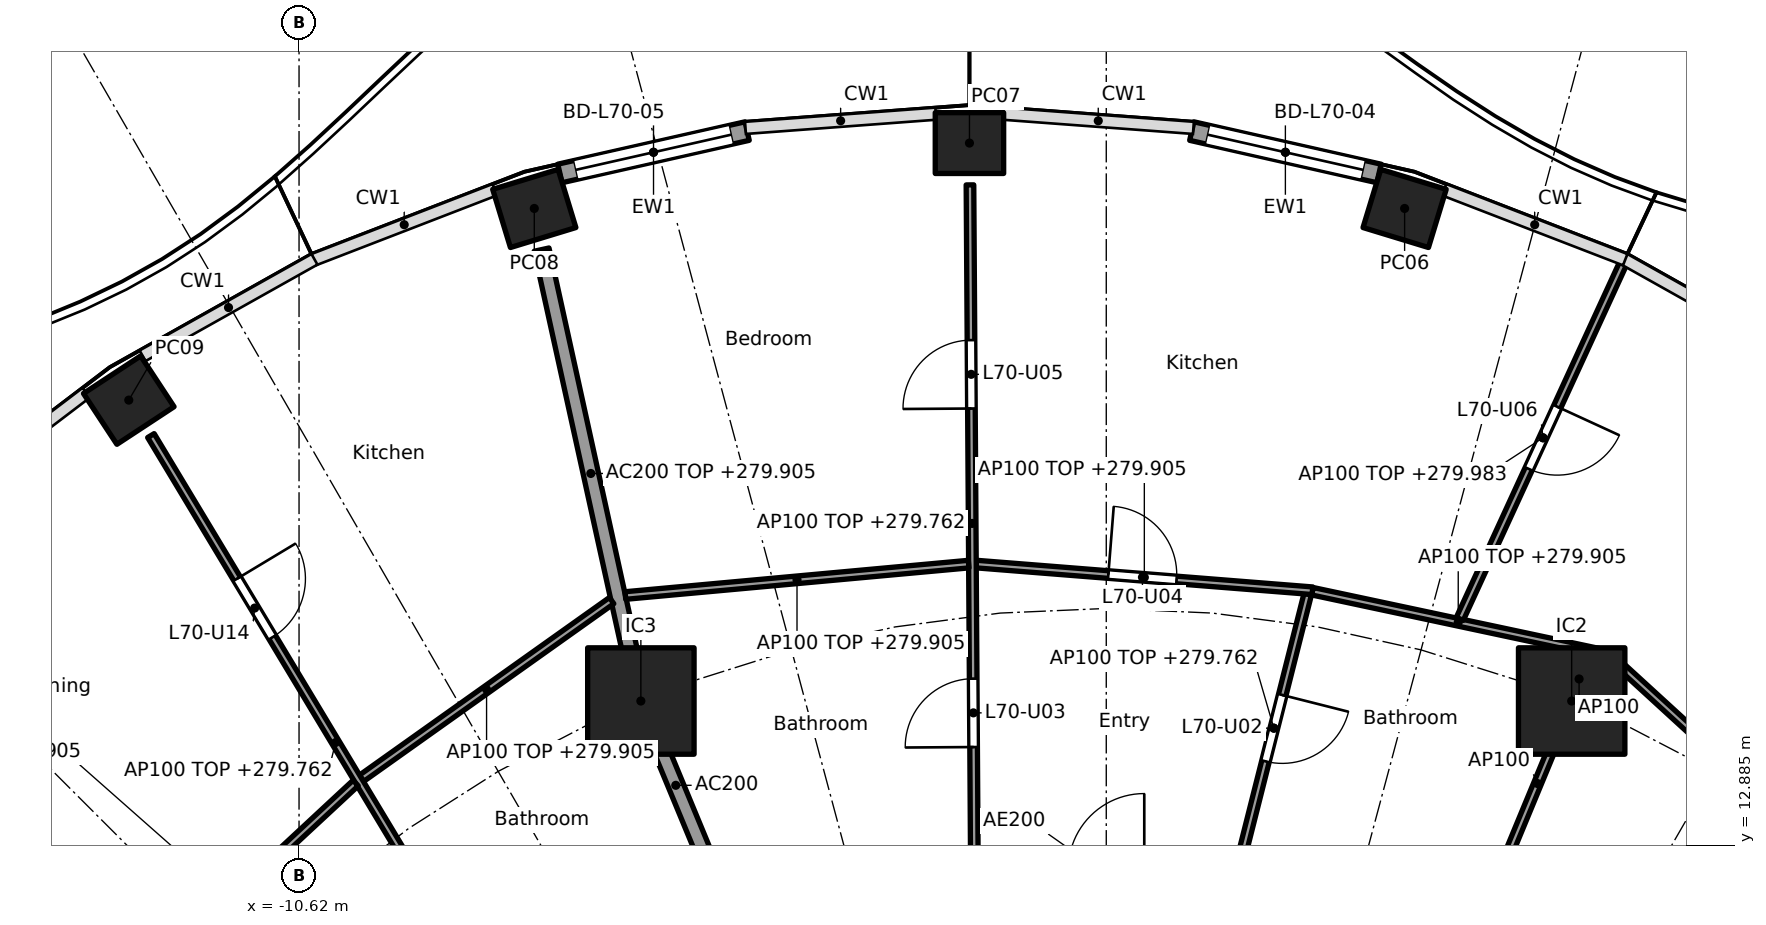
"""IFC4 building model, lengths in metres.
Left out: names, types, materials, properties, quantities, classifications, styles, units other than length and angle.
Written with IfcOpenShell. Run it as: python <this file> out.ifc"""

import sys

from ifc_helpers import new_model, si_unit, direction, frame, frame_2d, origin, origin_2d, place, context, subcontext, project, spatial, rectangle, hollow_rectangle, extrude, element, fill, save


model = new_model("IFC4")
c1 = context("Model", 3, precision=1e-05, world=origin(), true_north=direction((0.0, 1.0)))
c2 = subcontext(c1, "Body", "Model", "MODEL_VIEW")
j1 = project(units=[si_unit("LENGTHUNIT", "METRE"), si_unit("PLANEANGLEUNIT", "RADIAN")], contexts=[c1])
p1 = place(None, origin())
s1 = spatial("IfcSite", under=j1, at=p1, CompositionType="ELEMENT")
p2 = place(p1, origin())
s2 = spatial("IfcBuilding", under=s1, at=p2, CompositionType="ELEMENT")
p3 = place(p2, frame((0.0, 0.0, 277.0)))
s3 = spatial("IfcBuildingStorey", under=s2, at=p3, CompositionType="ELEMENT", Elevation=277.0)
for number, where, z_axis, x_axis in (
    (1, (3.925, 21.262, 0.0), (0.0, 0.0, 1.0), (-0.957, 0.292, 0.0)),
    (2, (-1.8, 22.122, 0.0), (0.0, 0.0, 1.0), (-1.0, 0.0, 0.0)),
    (3, (-7.525, 21.262, 0.0), (0.0, 0.0, 1.0), (-0.957, -0.292, 0.0)),
    (4, (-12.86, 18.741, 0.0), (0.0, 0.0, 1.0), (-0.836, -0.549, 0.0)),
):
    element("IfcColumn", number, at=place(p3, frame(where, z_axis=z_axis, x_axis=x_axis)), inside=s3, PredefinedType="COLUMN", context=c2, shape_type="SweptSolid", body=[
        extrude(hollow_rectangle(XDim=0.9, YDim=0.8, WallThickness=0.028, at=origin_2d()), origin(), (0.0, 0.0, 1.0), 3.7),
    ])
for number, where, z_axis, x_axis in (
    (5, (6.123, 14.782, 0.0), (0.0, 0.0, 1.0), (1.0, 0.0, 0.0)),
    (6, (-6.123, 14.782, 0.0), (0.0, 0.0, 1.0), (1.0, 0.0, 0.0)),
):
    element("IfcColumn", number, at=place(p3, frame(where, z_axis=z_axis, x_axis=x_axis)), inside=s3, PredefinedType="COLUMN", context=c2, shape_type="SweptSolid", body=[
        extrude(rectangle(XDim=1.4, YDim=1.4, at=origin_2d()), origin(), (0.0, 0.0, 1.0), 3.7),
    ])
p4 = place(p3, frame((1.125, 22.28, 0.0), z_axis=(0.0, 0.0, 1.0), x_axis=(0.97531487046, -0.22081871175, 0.0)))
e7 = element("IfcWall", 7, at=p4, inside=s3, PredefinedType="SOLIDWALL", context=c2, shape_type="SweptSolid", body=[
    extrude(rectangle(XDim=2.525, YDim=0.25, at=frame_2d((1.263, 0.0))), origin(), (0.0, 0.0, 1.0), 3.44),
])
p5 = place(p4, frame((0.213, 0.0, 0.0)))
e8 = element("IfcOpeningElement", 8, at=p5, cuts=e7, PredefinedType="OPENING", context=c2, shape_type="SweptSolid", body=[
    extrude(rectangle(XDim=2.1, YDim=2.4, at=frame_2d((1.05, 1.2))), frame((0.0, 0.135, 0.0), z_axis=(0.0, -1.0, 0.0), x_axis=(1.0, 0.0, 0.0)), (0.0, 0.0, 1.0), 0.27),
])
p6 = place(p3, frame((-7.188, 21.723, 0.0), z_axis=(0.0, 0.0, 1.0), x_axis=(0.975319584032, 0.220797891756, 0.0)))
e9 = element("IfcWall", 9, at=p6, inside=s3, PredefinedType="SOLIDWALL", context=c2, shape_type="SweptSolid", body=[
    extrude(rectangle(XDim=2.525, YDim=0.25, at=frame_2d((1.263, 0.0))), origin(), (0.0, 0.0, 1.0), 3.44),
])
p7 = place(p6, frame((0.213, 0.0, 0.0)))
e10 = element("IfcOpeningElement", 10, at=p7, cuts=e9, PredefinedType="OPENING", context=c2, shape_type="SweptSolid", body=[
    extrude(rectangle(XDim=2.1, YDim=2.4, at=frame_2d((1.05, 1.2))), frame((0.0, 0.135, 0.0), z_axis=(0.0, -1.0, 0.0), x_axis=(1.0, 0.0, 0.0)), (0.0, 0.0, 1.0), 0.27),
])
p8 = place(p3, frame((-5.243, 12.657, 0.0), z_axis=(0.0, 0.0, 1.0), x_axis=(-0.38273085373, 0.923859888513, 0.0)))
e11 = element("IfcWall", 11, at=p8, inside=s3, PredefinedType="PARTITIONING", context=c2, shape_type="SweptSolid", body=[
    extrude(rectangle(XDim=2.199, YDim=0.2, at=frame_2d((1.1, 0.0))), origin(), (0.0, 0.0, 1.0), 3.44),
])
p9 = place(p3, frame((-6.134, 14.831, 0.0), z_axis=(0.0, 0.0, 1.0), x_axis=(-0.214842475666, 0.976648714047, 0.0)))
e12 = element("IfcWall", 12, at=p9, inside=s3, PredefinedType="PARTITIONING", context=c2, shape_type="SweptSolid", body=[
    extrude(rectangle(XDim=6.031, YDim=0.2, at=frame_2d((3.015, 0.0))), origin(), (0.0, 0.0, 1.0), 2.905),
])
p10 = place(p3, frame((10.972, 11.398, 0.0), z_axis=(0.0, 0.0, 1.0), x_axis=(-0.737838738013, 0.674977034193, 0.0)))
e13 = element("IfcWall", 13, at=p10, inside=s3, PredefinedType="PARTITIONING", context=c2, shape_type="SweptSolid", body=[
    extrude(rectangle(XDim=5.977, YDim=0.1, at=frame_2d((2.989, 0.0))), origin(), (0.0, 0.0, 1.0), 2.905),
])
p11 = place(p10, frame((2.514, 0.0, 0.0)))
e14 = element("IfcOpeningElement", 14, at=p11, cuts=e13, PredefinedType="OPENING", context=c2, shape_type="SweptSolid", body=[
    extrude(rectangle(XDim=0.9, YDim=2.1, at=frame_2d((0.45, 1.05))), frame((0.0, 0.06, 0.0), z_axis=(0.0, -1.0, 0.0), x_axis=(1.0, 0.0, 0.0)), (0.0, 0.0, 1.0), 0.12),
])
p12 = place(p3, frame((5.243, 12.657, 0.0), z_axis=(0.0, 0.0, 1.0), x_axis=(0.382719158442, 0.923864733477, 0.0)))
e15 = element("IfcWall", 15, at=p12, inside=s3, PredefinedType="PARTITIONING", context=c2, shape_type="SweptSolid", body=[
    extrude(rectangle(XDim=2.25, YDim=0.1, at=frame_2d((1.125, 0.0))), origin(), (0.0, 0.0, 1.0), 3.44),
])
p13 = place(p3, frame((6.55, 15.409, 0.0), z_axis=(0.0, 0.0, 1.0), x_axis=(-0.978051195976, 0.208364723621, 0.0)))
e16 = element("IfcWall", 16, at=p13, inside=s3, PredefinedType="PARTITIONING", context=c2, shape_type="SweptSolid", body=[
    extrude(rectangle(XDim=3.924, YDim=0.1, at=frame_2d((1.962, 0.0))), origin(), (0.0, 0.0, 1.0), 2.905),
])
p14 = place(p3, frame((4.651, 15.863, 0.0), z_axis=(0.0, 0.0, 1.0), x_axis=(0.41744196735, 0.908703584176, 0.0)))
e17 = element("IfcWall", 17, at=p14, inside=s3, PredefinedType="PARTITIONING", context=c2, shape_type="SweptSolid", body=[
    extrude(rectangle(XDim=5.242, YDim=0.1, at=frame_2d((2.621, 0.0))), origin(), (0.0, 0.0, 1.0), 2.983),
])
p15 = place(p14, frame((2.171, 0.0, 0.0)))
e18 = element("IfcOpeningElement", 18, at=p15, cuts=e17, PredefinedType="OPENING", context=c2, shape_type="SweptSolid", body=[
    extrude(rectangle(XDim=0.9, YDim=2.1, at=frame_2d((0.45, 1.05))), frame((0.0, 0.06, 0.0), z_axis=(0.0, -1.0, 0.0), x_axis=(1.0, 0.0, 0.0)), (0.0, 0.0, 1.0), 0.12),
])
p16 = place(p3, frame((1.759, 12.662, 0.0), z_axis=(0.0, 0.0, 1.0), x_axis=(0.244966765147, 0.969531476525, 0.0)))
e19 = element("IfcWall", 19, at=p16, inside=s3, PredefinedType="PARTITIONING", context=c2, shape_type="SweptSolid", body=[
    extrude(rectangle(XDim=3.638, YDim=0.1, at=frame_2d((1.819, 0.0))), origin(), (0.0, 0.0, 1.0), 2.762),
])
p17 = place(p16, frame((1.369, 0.0, 0.0)))
e20 = element("IfcOpeningElement", 20, at=p17, cuts=e19, PredefinedType="OPENING", context=c2, shape_type="SweptSolid", body=[
    extrude(rectangle(XDim=0.9, YDim=2.1, at=frame_2d((0.45, 1.05))), frame((0.0, 0.06, 0.0), z_axis=(0.0, -1.0, 0.0), x_axis=(1.0, 0.0, 0.0)), (0.0, 0.0, 1.0), 0.12),
])
p18 = place(p3, frame((2.713, 16.233, 0.0), z_axis=(0.0, 0.0, 1.0), x_axis=(-0.996870142942, 0.079056423588, 0.0)))
e21 = element("IfcWall", 21, at=p18, inside=s3, PredefinedType="PARTITIONING", context=c2, shape_type="SweptSolid", body=[
    extrude(rectangle(XDim=4.438, YDim=0.1, at=frame_2d((2.219, 0.0))), origin(), (0.0, 0.0, 1.0), 2.905),
])
p19 = place(p18, frame((1.794, 0.0, 0.0)))
e22 = element("IfcOpeningElement", 22, at=p19, cuts=e21, PredefinedType="OPENING", context=c2, shape_type="SweptSolid", body=[
    extrude(rectangle(XDim=0.9, YDim=2.1, at=frame_2d((0.45, 1.05))), frame((0.0, 0.06, 0.0), z_axis=(0.0, -1.0, 0.0), x_axis=(1.0, 0.0, 0.0)), (0.0, 0.0, 1.0), 0.12),
])
p20 = place(p3, frame((-1.736, 12.665, 0.0), z_axis=(0.0, 0.0, 1.0), x_axis=(-0.00646827636, 0.999979080482, 0.0)))
e23 = element("IfcWall", 23, at=p20, inside=s3, PredefinedType="PARTITIONING", context=c2, shape_type="SweptSolid", body=[
    extrude(rectangle(XDim=8.908, YDim=0.1, at=frame_2d((4.454, 0.0))), origin(), (0.0, 0.0, 1.0), 2.762),
])
p21 = place(p20, frame((1.512, 0.0, 0.0)))
e24 = element("IfcOpeningElement", 24, at=p21, cuts=e23, PredefinedType="OPENING", context=c2, shape_type="SweptSolid", body=[
    extrude(rectangle(XDim=0.9, YDim=2.1, at=frame_2d((0.45, 1.05))), frame((0.0, 0.06, 0.0), z_axis=(0.0, -1.0, 0.0), x_axis=(1.0, 0.0, 0.0)), (0.0, 0.0, 1.0), 0.12),
])
p22 = place(p20, frame((5.965, 0.0, 0.0)))
e25 = element("IfcOpeningElement", 25, at=p22, cuts=e23, PredefinedType="OPENING", context=c2, shape_type="SweptSolid", body=[
    extrude(rectangle(XDim=0.9, YDim=2.1, at=frame_2d((0.45, 1.05))), frame((0.0, 0.06, 0.0), z_axis=(0.0, -1.0, 0.0), x_axis=(1.0, 0.0, 0.0)), (0.0, 0.0, 1.0), 0.12),
])
p23 = place(p3, frame((-1.811, 16.583, 0.0), z_axis=(0.0, 0.0, 1.0), x_axis=(-0.995842301034, -0.091093970555, 0.0)))
e26 = element("IfcWall", 26, at=p23, inside=s3, PredefinedType="PARTITIONING", context=c2, shape_type="SweptSolid", body=[
    extrude(rectangle(XDim=4.535, YDim=0.1, at=frame_2d((2.267, 0.0))), origin(), (0.0, 0.0, 1.0), 2.905),
])
p24 = place(p3, frame((-6.508, 16.103, 0.0), z_axis=(0.0, 0.0, 1.0), x_axis=(-0.815202203556, -0.579176456114, 0.0)))
e27 = element("IfcWall", 27, at=p24, inside=s3, PredefinedType="PARTITIONING", context=c2, shape_type="SweptSolid", body=[
    extrude(rectangle(XDim=4.036, YDim=0.1, at=frame_2d((2.018, 0.0))), origin(), (0.0, 0.0, 1.0), 2.905),
])
p25 = place(p3, frame((-7.709, 10.197, 0.0), z_axis=(0.0, 0.0, 1.0), x_axis=(-0.515516160663, 0.856879856278, 0.0)))
e28 = element("IfcWall", 28, at=p25, inside=s3, PredefinedType="PARTITIONING", context=c2, shape_type="SweptSolid", body=[
    extrude(rectangle(XDim=9.426, YDim=0.1, at=frame_2d((4.713, 0.0))), origin(), (0.0, 0.0, 1.0), 2.762),
])
p26 = place(p25, frame((1.615, 0.0, 0.0)))
e29 = element("IfcOpeningElement", 29, at=p26, cuts=e28, PredefinedType="OPENING", context=c2, shape_type="SweptSolid", body=[
    extrude(rectangle(XDim=0.9, YDim=2.1, at=frame_2d((0.45, 1.05))), frame((0.0, 0.06, 0.0), z_axis=(0.0, -1.0, 0.0), x_axis=(1.0, 0.0, 0.0)), (0.0, 0.0, 1.0), 0.12),
])
p27 = place(p25, frame((6.328, 0.0, 0.0)))
e30 = element("IfcOpeningElement", 30, at=p27, cuts=e28, PredefinedType="OPENING", context=c2, shape_type="SweptSolid", body=[
    extrude(rectangle(XDim=0.9, YDim=2.1, at=frame_2d((0.45, 1.05))), frame((0.0, 0.06, 0.0), z_axis=(0.0, -1.0, 0.0), x_axis=(1.0, 0.0, 0.0)), (0.0, 0.0, 1.0), 0.12),
])
p28 = place(p3, frame((-9.875, 13.702, 0.0), z_axis=(0.0, 0.0, 1.0), x_axis=(-0.732618266441, -0.680639754699, 0.0)))
e31 = element("IfcWall", 31, at=p28, inside=s3, PredefinedType="PARTITIONING", context=c2, shape_type="SweptSolid", body=[
    extrude(rectangle(XDim=4.467, YDim=0.1, at=frame_2d((2.233, 0.0))), origin(), (0.0, 0.0, 1.0), 2.905),
])
p29 = place(p28, frame((1.783, 0.0, 0.0)))
e32 = element("IfcOpeningElement", 32, at=p29, cuts=e31, PredefinedType="OPENING", context=c2, shape_type="SweptSolid", body=[
    extrude(rectangle(XDim=0.9, YDim=2.1, at=frame_2d((0.45, 1.05))), frame((0.0, 0.06, 0.0), z_axis=(0.0, -1.0, 0.0), x_axis=(1.0, 0.0, 0.0)), (0.0, 0.0, 1.0), 0.12),
])
p30 = place(p3, frame((-10.183, 7.727, 0.0), z_axis=(0.0, 0.0, 1.0), x_axis=(-0.719063433856, 0.694944442449, 0.0)))
e33 = element("IfcWall", 33, at=p30, inside=s3, PredefinedType="PARTITIONING", context=c2, shape_type="SweptSolid", body=[
    extrude(rectangle(XDim=9.535, YDim=0.1, at=frame_2d((4.768, 0.0))), origin(), (0.0, 0.0, 1.0), 2.762),
])
p31 = place(p30, frame((1.637, 0.0, 0.0)))
e34 = element("IfcOpeningElement", 34, at=p31, cuts=e33, PredefinedType="OPENING", context=c2, shape_type="SweptSolid", body=[
    extrude(rectangle(XDim=0.9, YDim=2.1, at=frame_2d((0.45, 1.05))), frame((0.0, 0.06, 0.0), z_axis=(0.0, -1.0, 0.0), x_axis=(1.0, 0.0, 0.0)), (0.0, 0.0, 1.0), 0.12),
])
p32 = place(p30, frame((6.405, 0.0, 0.0)))
e35 = element("IfcOpeningElement", 35, at=p32, cuts=e33, PredefinedType="OPENING", context=c2, shape_type="SweptSolid", body=[
    extrude(rectangle(XDim=0.9, YDim=2.1, at=frame_2d((0.45, 1.05))), frame((0.0, 0.06, 0.0), z_axis=(0.0, -1.0, 0.0), x_axis=(1.0, 0.0, 0.0)), (0.0, 0.0, 1.0), 0.12),
])
p33 = place(p3, frame((6.388, 15.29, 0.0), z_axis=(0.0, 0.0, 1.0), x_axis=(-0.610612392422, -0.791929609385, 0.0)))
e36 = element("IfcWall", 36, at=p33, inside=s3, PredefinedType="PARTITIONING", context=c2, shape_type="SweptSolid", body=[
    extrude(rectangle(XDim=0.549, YDim=0.1, at=frame_2d((0.275, 0.0))), origin(), (0.0, 0.0, 1.0), 3.44),
])
p34 = place(p5, origin())
e37 = element("IfcDoor", 37, at=p34, inside=s3, OperationType="SLIDING_TO_LEFT", PredefinedType="DOOR", context=c2, shape_type="SweptSolid", body=[
    extrude(rectangle(XDim=2.1, YDim=2.4, at=frame_2d((1.05, 1.2))), frame((0.0, 0.025, 0.0), z_axis=(0.0, -1.0, 0.0), x_axis=(1.0, 0.0, 0.0)), (0.0, 0.0, 1.0), 0.05),
])
fill(e8, e37)
p35 = place(p7, origin())
e38 = element("IfcDoor", 38, at=p35, inside=s3, OperationType="SLIDING_TO_LEFT", PredefinedType="DOOR", context=c2, shape_type="SweptSolid", body=[
    extrude(rectangle(XDim=2.1, YDim=2.4, at=frame_2d((1.05, 1.2))), frame((0.0, 0.025, 0.0), z_axis=(0.0, -1.0, 0.0), x_axis=(1.0, 0.0, 0.0)), (0.0, 0.0, 1.0), 0.05),
])
fill(e10, e38)
p36 = place(p17, frame((0.9, 0.0, 0.0), x_axis=(-1.0, 0.0, 0.0)))
e39 = element("IfcDoor", 39, at=p36, inside=s3, OperationType="SINGLE_SWING_LEFT", PredefinedType="DOOR", context=c2, shape_type="SweptSolid", body=[
    extrude(rectangle(XDim=0.9, YDim=2.1, at=frame_2d((0.45, 1.05))), frame((0.0, 0.025, 0.0), z_axis=(0.0, -1.0, 0.0), x_axis=(1.0, 0.0, 0.0)), (0.0, 0.0, 1.0), 0.05),
])
fill(e20, e39)
p37 = place(p21, origin())
e40 = element("IfcDoor", 40, at=p37, inside=s3, OperationType="SINGLE_SWING_LEFT", PredefinedType="DOOR", context=c2, shape_type="SweptSolid", body=[
    extrude(rectangle(XDim=0.9, YDim=2.1, at=frame_2d((0.45, 1.05))), frame((0.0, 0.025, 0.0), z_axis=(0.0, -1.0, 0.0), x_axis=(1.0, 0.0, 0.0)), (0.0, 0.0, 1.0), 0.05),
])
fill(e24, e40)
p38 = place(p19, frame((0.9, 0.0, 0.0), x_axis=(-1.0, 0.0, 0.0)))
e41 = element("IfcDoor", 41, at=p38, inside=s3, OperationType="SINGLE_SWING_LEFT", PredefinedType="DOOR", context=c2, shape_type="SweptSolid", body=[
    extrude(rectangle(XDim=0.9, YDim=2.1, at=frame_2d((0.45, 1.05))), frame((0.0, 0.025, 0.0), z_axis=(0.0, -1.0, 0.0), x_axis=(1.0, 0.0, 0.0)), (0.0, 0.0, 1.0), 0.05),
])
fill(e22, e41)
p39 = place(p22, origin())
e42 = element("IfcDoor", 42, at=p39, inside=s3, OperationType="SINGLE_SWING_LEFT", PredefinedType="DOOR", context=c2, shape_type="SweptSolid", body=[
    extrude(rectangle(XDim=0.9, YDim=2.1, at=frame_2d((0.45, 1.05))), frame((0.0, 0.025, 0.0), z_axis=(0.0, -1.0, 0.0), x_axis=(1.0, 0.0, 0.0)), (0.0, 0.0, 1.0), 0.05),
])
fill(e25, e42)
p40 = place(p15, frame((0.9, 0.0, 0.0), x_axis=(-1.0, 0.0, 0.0)))
e43 = element("IfcDoor", 43, at=p40, inside=s3, OperationType="SINGLE_SWING_LEFT", PredefinedType="DOOR", context=c2, shape_type="SweptSolid", body=[
    extrude(rectangle(XDim=0.9, YDim=2.1, at=frame_2d((0.45, 1.05))), frame((0.0, 0.025, 0.0), z_axis=(0.0, -1.0, 0.0), x_axis=(1.0, 0.0, 0.0)), (0.0, 0.0, 1.0), 0.05),
])
fill(e18, e43)
p41 = place(p27, frame((0.9, 0.0, 0.0), x_axis=(-1.0, 0.0, 0.0)))
e44 = element("IfcDoor", 44, at=p41, inside=s3, OperationType="SINGLE_SWING_LEFT", PredefinedType="DOOR", context=c2, shape_type="SweptSolid", body=[
    extrude(rectangle(XDim=0.9, YDim=2.1, at=frame_2d((0.45, 1.05))), frame((0.0, 0.025, 0.0), z_axis=(0.0, -1.0, 0.0), x_axis=(1.0, 0.0, 0.0)), (0.0, 0.0, 1.0), 0.05),
])
fill(e30, e44)
save(model, sys.argv[1])
